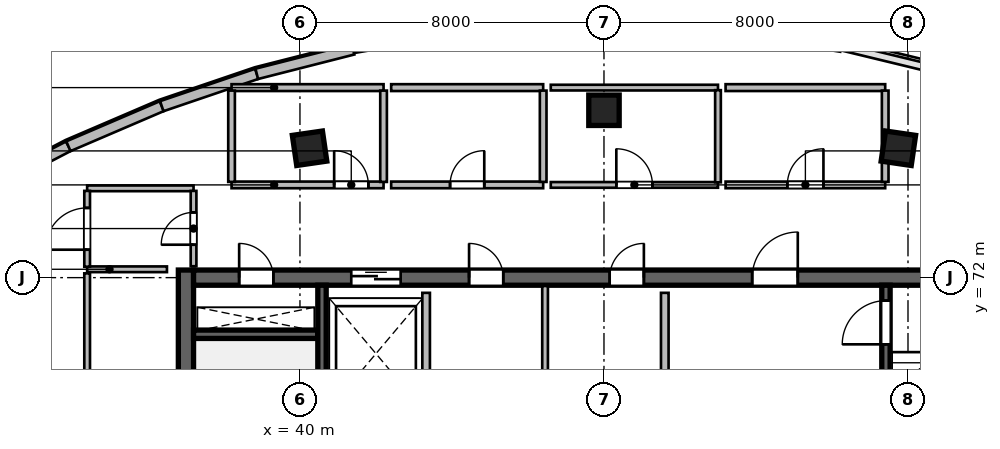
"""IFC4 building model, lengths in metres.
Left out: names, types, materials, properties, quantities, classifications, styles, units other than length and angle.
Written with IfcOpenShell. Run it as: python <this file> out.ifc"""

import sys

from ifc_helpers import new_model, si_unit, direction, frame, frame_2d, origin, origin_2d, place, context, subcontext, project, spatial, rectangle, extrude, source, transform, mapped, element, fill, save


model = new_model("IFC4")
c1 = context("Model", 3, precision=1e-05, world=origin(), true_north=direction((0.0, 1.0)))
c2 = subcontext(c1, "Body", "Model", "MODEL_VIEW")
j1 = project(units=[si_unit("LENGTHUNIT", "METRE"), si_unit("PLANEANGLEUNIT", "RADIAN")], contexts=[c1])
p1 = place(None, origin())
s1 = spatial("IfcSite", under=j1, at=p1, CompositionType="ELEMENT")
p2 = place(p1, origin())
s2 = spatial("IfcBuilding", under=s1, at=p2, CompositionType="ELEMENT")
p3 = place(p2, frame((0.0, 0.0, 299.1)))
s3 = spatial("IfcBuildingStorey", under=s2, at=p3, CompositionType="ELEMENT", Elevation=299.1)
m1 = source(origin(), c2, "Body", "SweptSolid", [
    extrude(rectangle(XDim=12.0, YDim=0.4, at=frame_2d((6.0, 0.0))), origin(), (0.0, 0.0, 1.0), 3.9),
])
p4 = place(p3, frame((37.0, 60.2, 0.0), z_axis=(0.0, 0.0, 1.0), x_axis=(0.0, 1.0, 0.0)))
e1 = element("IfcWall", 1, at=p4, inside=s3, PredefinedType="SHEAR", context=c2, shape_type="MappedRepresentation", body=[
    mapped(m1, transform((0.0, 0.0, 0.0), scale=1.0)),
])
m2 = source(origin(), c2, "Body", "SweptSolid", [
    extrude(rectangle(XDim=21.6, YDim=0.4, at=frame_2d((10.8, 0.0))), origin(), (0.0, 0.0, 1.0), 3.9),
])
p5 = place(p3, frame((37.2, 72.0, 0.0), z_axis=(0.0, 0.0, 1.0), x_axis=(1.0, 0.0, 0.0)))
e2 = element("IfcWall", 2, at=p5, inside=s3, PredefinedType="SHEAR", context=c2, shape_type="MappedRepresentation", body=[
    mapped(m2, transform((0.0, 0.0, 0.0), scale=1.0)),
])
p6 = place(p5, frame((1.2, 0.0, 0.0)))
e3 = element("IfcOpeningElement", 3, at=p6, cuts=e2, PredefinedType="OPENING", context=c2, shape_type="SweptSolid", body=[
    extrude(rectangle(XDim=0.9, YDim=2.1, at=frame_2d((0.45, 1.05))), frame((0.0, 0.21, 0.0), z_axis=(0.0, -1.0, 0.0), x_axis=(1.0, 0.0, 0.0)), (0.0, 0.0, 1.0), 0.42),
])
p7 = place(p5, frame((14.7, 0.0, 0.0)))
e4 = element("IfcOpeningElement", 4, at=p7, cuts=e2, PredefinedType="OPENING", context=c2, shape_type="SweptSolid", body=[
    extrude(rectangle(XDim=1.2, YDim=2.15, at=frame_2d((0.6, 1.075))), frame((0.0, 0.21, 0.0), z_axis=(0.0, -1.0, 0.0), x_axis=(1.0, 0.0, 0.0)), (0.0, 0.0, 1.0), 0.42),
])
p8 = place(p5, frame((4.15, 0.0, 0.0)))
e5 = element("IfcOpeningElement", 5, at=p8, cuts=e2, PredefinedType="OPENING", context=c2, shape_type="SweptSolid", body=[
    extrude(rectangle(XDim=1.3, YDim=2.15, at=frame_2d((0.65, 1.075))), frame((0.0, 0.21, 0.0), z_axis=(0.0, -1.0, 0.0), x_axis=(1.0, 0.0, 0.0)), (0.0, 0.0, 1.0), 0.42),
])
p9 = place(p5, frame((7.25, 0.0, 0.0)))
e6 = element("IfcOpeningElement", 6, at=p9, cuts=e2, PredefinedType="OPENING", context=c2, shape_type="SweptSolid", body=[
    extrude(rectangle(XDim=0.9, YDim=2.1, at=frame_2d((0.45, 1.05))), frame((0.0, 0.21, 0.0), z_axis=(0.0, -1.0, 0.0), x_axis=(1.0, 0.0, 0.0)), (0.0, 0.0, 1.0), 0.42),
])
p10 = place(p5, frame((10.95, 0.0, 0.0)))
e7 = element("IfcOpeningElement", 7, at=p10, cuts=e2, PredefinedType="OPENING", context=c2, shape_type="SweptSolid", body=[
    extrude(rectangle(XDim=0.9, YDim=2.1, at=frame_2d((0.45, 1.05))), frame((0.0, 0.21, 0.0), z_axis=(0.0, -1.0, 0.0), x_axis=(1.0, 0.0, 0.0)), (0.0, 0.0, 1.0), 0.42),
])
m3 = source(origin(), c2, "Body", "SweptSolid", [
    extrude(rectangle(XDim=3.27, YDim=0.22, at=frame_2d((1.635, 0.0))), origin(), (0.0, 0.0, 1.0), 3.9),
])
p11 = place(p3, frame((37.2, 70.51, 0.0), z_axis=(0.0, 0.0, 1.0), x_axis=(1.0, 0.0, 0.0)))
e8 = element("IfcWall", 8, at=p11, inside=s3, PredefinedType="SHEAR", context=c2, shape_type="MappedRepresentation", body=[
    mapped(m3, transform((0.0, 0.0, 0.0), scale=1.0)),
])
m4 = source(origin(), c2, "Body", "SweptSolid", [
    extrude(rectangle(XDim=11.2, YDim=0.22, at=frame_2d((5.6, 0.0))), origin(), (0.0, 0.0, 1.0), 3.9),
])
p12 = place(p3, frame((40.58, 60.6, 0.0), z_axis=(0.0, 0.0, 1.0), x_axis=(0.0, 1.0, 0.0)))
e9 = element("IfcWall", 9, at=p12, inside=s3, PredefinedType="SHEAR", context=c2, shape_type="MappedRepresentation", body=[
    mapped(m4, transform((0.0, 0.0, 0.0), scale=1.0)),
])
p13 = place(p3, frame((55.42, 60.6, 0.0), z_axis=(0.0, 0.0, 1.0), x_axis=(0.0, 1.0, 0.0)))
e10 = element("IfcWall", 10, at=p13, inside=s3, PredefinedType="SHEAR", context=c2, shape_type="MappedRepresentation", body=[
    mapped(m4, transform((0.0, 0.0, 0.0), scale=1.0)),
])
p14 = place(p13, frame((9.645, 0.0, 0.0)))
e11 = element("IfcOpeningElement", 11, at=p14, cuts=e10, PredefinedType="OPENING", context=c2, shape_type="SweptSolid", body=[
    extrude(rectangle(XDim=1.15, YDim=2.15, at=frame_2d((0.575, 1.075))), frame((0.0, 0.12, 0.0), z_axis=(0.0, -1.0, 0.0), x_axis=(1.0, 0.0, 0.0)), (0.0, 0.0, 1.0), 0.24),
])
m5 = source(origin(), c2, "Body", "SweptSolid", [
    extrude(rectangle(XDim=0.8, YDim=0.8, at=origin_2d()), origin(), (0.0, 0.0, 1.0), 3.9),
])
for number, where, z_axis, x_axis in (
    (12, (40.253, 75.404, 0.0), (0.0, 0.0, 1.0), (-0.143, 0.99, 0.0)),
    (13, (48.0, 76.404, 0.0), (0.0, 0.0, 1.0), (0.0, 1.0, 0.0)),
    (14, (55.747, 75.404, 0.0), (0.0, 0.0, 1.0), (0.143, 0.99, 0.0)),
):
    element("IfcColumn", number, at=place(p3, frame(where, z_axis=z_axis, x_axis=x_axis)), inside=s3, PredefinedType="COLUMN", context=c2, shape_type="MappedRepresentation", body=[
        mapped(m5, transform((0.0, 0.0, 0.0), scale=1.0)),
    ])
m6 = source(origin(), c2, "Body", "SweptSolid", [
    extrude(rectangle(XDim=2.711, YDim=0.28, at=frame_2d((1.356, 0.0))), origin(), (0.0, 0.0, 1.0), 3.64),
])
p15 = place(p3, frame((31.502, 74.205, 0.0), z_axis=(0.0, 0.0, 1.0), x_axis=(0.886828760751, 0.462098202881, 0.0)))
e15 = element("IfcWall", 15, at=p15, inside=s3, PredefinedType="SOLIDWALL", context=c2, shape_type="MappedRepresentation", body=[
    mapped(m6, transform((0.0, 0.0, 0.0), scale=1.0)),
])
m7 = source(origin(), c2, "Body", "SweptSolid", [
    extrude(rectangle(XDim=2.673, YDim=0.28, at=frame_2d((1.337, 0.0))), origin(), (0.0, 0.0, 1.0), 3.64),
])
p16 = place(p3, frame((33.907, 75.458, 0.0), z_axis=(0.0, 0.0, 1.0), x_axis=(0.919036345912, 0.394172798266, 0.0)))
e16 = element("IfcWall", 16, at=p16, inside=s3, PredefinedType="SOLIDWALL", context=c2, shape_type="MappedRepresentation", body=[
    mapped(m7, transform((0.0, 0.0, 0.0), scale=1.0)),
])
m8 = source(origin(), c2, "Body", "SweptSolid", [
    extrude(rectangle(XDim=2.64, YDim=0.28, at=frame_2d((1.32, 0.0))), origin(), (0.0, 0.0, 1.0), 3.64),
])
p17 = place(p3, frame((36.364, 76.511, 0.0), z_axis=(0.0, 0.0, 1.0), x_axis=(0.946685911962, 0.322158011064, 0.0)))
e17 = element("IfcWall", 17, at=p17, inside=s3, PredefinedType="SOLIDWALL", context=c2, shape_type="MappedRepresentation", body=[
    mapped(m8, transform((0.0, 0.0, 0.0), scale=1.0)),
])
m9 = source(origin(), c2, "Body", "SweptSolid", [
    extrude(rectangle(XDim=2.614, YDim=0.28, at=frame_2d((1.307, 0.0))), origin(), (0.0, 0.0, 1.0), 3.64),
])
p18 = place(p3, frame((38.863, 77.362, 0.0), z_axis=(0.0, 0.0, 1.0), x_axis=(0.969106509315, 0.246642602978, 0.0)))
e18 = element("IfcWall", 18, at=p18, inside=s3, PredefinedType="SOLIDWALL", context=c2, shape_type="MappedRepresentation", body=[
    mapped(m9, transform((0.0, 0.0, 0.0), scale=1.0)),
])
m10 = source(origin(), c2, "Body", "SweptSolid", [
    extrude(rectangle(XDim=5.8, YDim=0.2, at=frame_2d((2.9, 0.0))), origin(), (0.0, 0.0, 1.0), 3.64),
])
p19 = place(p3, frame((49.6, 65.8, 0.0), z_axis=(0.0, 0.0, 1.0), x_axis=(0.0, 1.0, 0.0)))
e19 = element("IfcWall", 19, at=p19, inside=s3, PredefinedType="SOLIDWALL", context=c2, shape_type="MappedRepresentation", body=[
    mapped(m10, transform((0.0, 0.0, 0.0), scale=1.0)),
])
m11 = source(origin(), c2, "Body", "SweptSolid", [
    extrude(rectangle(XDim=3.2, YDim=0.2, at=frame_2d((1.6, 0.0))), origin(), (0.0, 0.0, 1.0), 3.64),
])
p20 = place(p3, frame((43.32, 68.4, 0.0), z_axis=(0.0, 0.0, 1.0), x_axis=(0.0, 1.0, 0.0)))
e20 = element("IfcWall", 20, at=p20, inside=s3, PredefinedType="SOLIDWALL", context=c2, shape_type="MappedRepresentation", body=[
    mapped(m11, transform((0.0, 0.0, 0.0), scale=1.0)),
])
m12 = source(origin(), c2, "Body", "SweptSolid", [
    extrude(rectangle(XDim=3.38, YDim=0.15, at=frame_2d((1.69, 0.0))), origin(), (0.0, 0.0, 1.0), 3.64),
])
p21 = place(p3, frame((46.45, 68.4, 0.0), z_axis=(0.0, 0.0, 1.0), x_axis=(0.0, 1.0, 0.0)))
e21 = element("IfcWall", 21, at=p21, inside=s3, PredefinedType="PARTITIONING", context=c2, shape_type="MappedRepresentation", body=[
    mapped(m12, transform((0.0, 0.0, 0.0), scale=1.0)),
])
m13 = source(origin(), c2, "Body", "SweptSolid", [
    extrude(rectangle(XDim=2.1, YDim=0.15, at=frame_2d((1.05, 0.0))), origin(), (0.0, 0.0, 1.0), 3.64),
])
p22 = place(p3, frame((34.4, 72.22, 0.0), z_axis=(0.0, 0.0, 1.0), x_axis=(1.0, 0.0, 0.0)))
e22 = element("IfcWall", 22, at=p22, inside=s3, PredefinedType="PARTITIONING", context=c2, shape_type="MappedRepresentation", body=[
    mapped(m13, transform((0.0, 0.0, 0.0), scale=1.0)),
])
m14 = source(origin(), c2, "Body", "SweptSolid", [
    extrude(rectangle(XDim=2.8, YDim=0.15, at=frame_2d((1.4, 0.0))), origin(), (0.0, 0.0, 1.0), 3.64),
])
p23 = place(p3, frame((34.4, 74.35, 0.0), z_axis=(0.0, 0.0, 1.0), x_axis=(1.0, 0.0, 0.0)))
e23 = element("IfcWall", 23, at=p23, inside=s3, PredefinedType="PARTITIONING", context=c2, shape_type="MappedRepresentation", body=[
    mapped(m14, transform((0.0, 0.0, 0.0), scale=1.0)),
])
m15 = source(origin(), c2, "Body", "SweptSolid", [
    extrude(rectangle(XDim=1.995, YDim=0.15, at=frame_2d((0.998, 0.0))), origin(), (0.0, 0.0, 1.0), 3.64),
])
p24 = place(p3, frame((34.4, 72.288, 0.0), z_axis=(0.0, 0.0, 1.0), x_axis=(0.0, 1.0, 0.0)))
e24 = element("IfcWall", 24, at=p24, inside=s3, PredefinedType="PARTITIONING", context=c2, shape_type="MappedRepresentation", body=[
    mapped(m15, transform((0.0, 0.0, 0.0), scale=1.0)),
])
p25 = place(p24, frame((0.448, 0.0, 0.0)))
e25 = element("IfcOpeningElement", 25, at=p25, cuts=e24, PredefinedType="OPENING", context=c2, shape_type="SweptSolid", body=[
    extrude(rectangle(XDim=1.1, YDim=2.15, at=frame_2d((0.55, 1.075))), frame((0.0, 0.085, 0.0), z_axis=(0.0, -1.0, 0.0), x_axis=(1.0, 0.0, 0.0)), (0.0, 0.0, 1.0), 0.17),
])
m16 = source(origin(), c2, "Body", "SweptSolid", [
    extrude(rectangle(XDim=1.982, YDim=0.15, at=frame_2d((0.991, 0.0))), origin(), (0.0, 0.0, 1.0), 3.64),
])
p26 = place(p3, frame((37.2, 72.3, 0.0), z_axis=(0.0, 0.0, 1.0), x_axis=(0.0, 1.0, 0.0)))
e26 = element("IfcWall", 26, at=p26, inside=s3, PredefinedType="PARTITIONING", context=c2, shape_type="MappedRepresentation", body=[
    mapped(m16, transform((0.0, 0.0, 0.0), scale=1.0)),
])
p27 = place(p26, frame((0.566, 0.0, 0.0)))
e27 = element("IfcOpeningElement", 27, at=p27, cuts=e26, PredefinedType="OPENING", context=c2, shape_type="SweptSolid", body=[
    extrude(rectangle(XDim=0.85, YDim=2.1, at=frame_2d((0.425, 1.05))), frame((0.0, 0.085, 0.0), z_axis=(0.0, -1.0, 0.0), x_axis=(1.0, 0.0, 0.0)), (0.0, 0.0, 1.0), 0.17),
])
m17 = source(origin(), c2, "Body", "SweptSolid", [
    extrude(rectangle(XDim=3.845, YDim=0.15, at=frame_2d((1.922, 0.0))), origin(), (0.0, 0.0, 1.0), 3.64),
])
p28 = place(p3, frame((34.4, 68.268, 0.0), z_axis=(0.0, 0.0, 1.0), x_axis=(0.0, 1.0, 0.0)))
e28 = element("IfcWall", 28, at=p28, inside=s3, PredefinedType="PARTITIONING", context=c2, shape_type="MappedRepresentation", body=[
    mapped(m17, transform((0.0, 0.0, 0.0), scale=1.0)),
])
m18 = source(origin(), c2, "Body", "SweptSolid", [
    extrude(rectangle(XDim=4.0, YDim=0.175, at=frame_2d((2.0, 0.0))), origin(), (0.0, 0.0, 1.0), 3.64),
])
p29 = place(p3, frame((38.2, 74.44, 0.0), z_axis=(0.0, 0.0, 1.0), x_axis=(1.0, 0.0, 0.0)))
e29 = element("IfcWall", 29, at=p29, inside=s3, PredefinedType="PARTITIONING", context=c2, shape_type="MappedRepresentation", body=[
    mapped(m18, transform((0.0, 0.0, 0.0), scale=1.0)),
])
p30 = place(p29, frame((2.7, 0.0, 0.0)))
e30 = element("IfcOpeningElement", 30, at=p30, cuts=e29, PredefinedType="OPENING", context=c2, shape_type="SweptSolid", body=[
    extrude(rectangle(XDim=0.9, YDim=2.08, at=frame_2d((0.45, 1.04))), frame((0.0, 0.098, 0.0), z_axis=(0.0, -1.0, 0.0), x_axis=(1.0, 0.0, 0.0)), (0.0, 0.0, 1.0), 0.195),
])
m19 = source(origin(), c2, "Body", "SweptSolid", [
    extrude(rectangle(XDim=4.0, YDim=0.18, at=frame_2d((2.0, 0.0))), origin(), (0.0, 0.0, 1.0), 3.64),
])
p31 = place(p3, frame((38.2, 77.0, 0.0), z_axis=(0.0, 0.0, 1.0), x_axis=(1.0, 0.0, 0.0)))
e31 = element("IfcWall", 31, at=p31, inside=s3, PredefinedType="PLUMBINGWALL", context=c2, shape_type="MappedRepresentation", body=[
    mapped(m19, transform((0.0, 0.0, 0.0), scale=1.0)),
])
m20 = source(origin(), c2, "Body", "SweptSolid", [
    extrude(rectangle(XDim=2.403, YDim=0.175, at=frame_2d((1.201, 0.0))), origin(), (0.0, 0.0, 1.0), 3.64),
])
for number, where, z_axis, x_axis in (
    (32, (38.2, 74.519, 0.0), (0.0, 0.0, 1.0), (0.0, 1.0, 0.0)),
    (33, (42.2, 74.519, 0.0), (0.0, 0.0, 1.0), (0.0, 1.0, 0.0)),
):
    element("IfcWall", number, at=place(p3, frame(where, z_axis=z_axis, x_axis=x_axis)), inside=s3, PredefinedType="PARTITIONING", context=c2, shape_type="MappedRepresentation", body=[
        mapped(m20, transform((0.0, 0.0, 0.0), scale=1.0)),
    ])
p32 = place(p3, frame((42.4, 74.44, 0.0), z_axis=(0.0, 0.0, 1.0), x_axis=(1.0, 0.0, 0.0)))
e34 = element("IfcWall", 34, at=p32, inside=s3, PredefinedType="PARTITIONING", context=c2, shape_type="MappedRepresentation", body=[
    mapped(m18, transform((0.0, 0.0, 0.0), scale=1.0)),
])
p33 = place(p32, frame((1.55, 0.0, 0.0)))
e35 = element("IfcOpeningElement", 35, at=p33, cuts=e34, PredefinedType="OPENING", context=c2, shape_type="SweptSolid", body=[
    extrude(rectangle(XDim=0.9, YDim=2.08, at=frame_2d((0.45, 1.04))), frame((0.0, 0.098, 0.0), z_axis=(0.0, -1.0, 0.0), x_axis=(1.0, 0.0, 0.0)), (0.0, 0.0, 1.0), 0.195),
])
p34 = place(p3, frame((42.4, 77.0, 0.0), z_axis=(0.0, 0.0, 1.0), x_axis=(1.0, 0.0, 0.0)))
e36 = element("IfcWall", 36, at=p34, inside=s3, PredefinedType="PLUMBINGWALL", context=c2, shape_type="MappedRepresentation", body=[
    mapped(m19, transform((0.0, 0.0, 0.0), scale=1.0)),
])
p35 = place(p3, frame((46.4, 74.519, 0.0), z_axis=(0.0, 0.0, 1.0), x_axis=(0.0, 1.0, 0.0)))
e37 = element("IfcWall", 37, at=p35, inside=s3, PredefinedType="PARTITIONING", context=c2, shape_type="MappedRepresentation", body=[
    mapped(m20, transform((0.0, 0.0, 0.0), scale=1.0)),
])
m21 = source(origin(), c2, "Body", "SweptSolid", [
    extrude(rectangle(XDim=4.4, YDim=0.15, at=frame_2d((2.2, 0.0))), origin(), (0.0, 0.0, 1.0), 3.64),
])
p36 = place(p3, frame((46.6, 74.44, 0.0), z_axis=(0.0, 0.0, 1.0), x_axis=(1.0, 0.0, 0.0)))
e38 = element("IfcWall", 38, at=p36, inside=s3, PredefinedType="PARTITIONING", context=c2, shape_type="MappedRepresentation", body=[
    mapped(m21, transform((0.0, 0.0, 0.0), scale=1.0)),
])
p37 = place(p36, frame((1.725, 0.0, 0.0)))
e39 = element("IfcOpeningElement", 39, at=p37, cuts=e38, PredefinedType="OPENING", context=c2, shape_type="SweptSolid", body=[
    extrude(rectangle(XDim=0.95, YDim=2.1, at=frame_2d((0.475, 1.05))), frame((0.0, 0.085, 0.0), z_axis=(0.0, -1.0, 0.0), x_axis=(1.0, 0.0, 0.0)), (0.0, 0.0, 1.0), 0.17),
])
p38 = place(p3, frame((46.6, 77.0, 0.0), z_axis=(0.0, 0.0, 1.0), x_axis=(1.0, 0.0, 0.0)))
e40 = element("IfcWall", 40, at=p38, inside=s3, PredefinedType="PARTITIONING", context=c2, shape_type="MappedRepresentation", body=[
    mapped(m21, transform((0.0, 0.0, 0.0), scale=1.0)),
])
m22 = source(origin(), c2, "Body", "SweptSolid", [
    extrude(rectangle(XDim=2.425, YDim=0.15, at=frame_2d((1.212, 0.0))), origin(), (0.0, 0.0, 1.0), 3.64),
])
p39 = place(p3, frame((51.0, 74.508, 0.0), z_axis=(0.0, 0.0, 1.0), x_axis=(0.0, 1.0, 0.0)))
e41 = element("IfcWall", 41, at=p39, inside=s3, PredefinedType="PARTITIONING", context=c2, shape_type="MappedRepresentation", body=[
    mapped(m22, transform((0.0, 0.0, 0.0), scale=1.0)),
])
m23 = source(origin(), c2, "Body", "SweptSolid", [
    extrude(rectangle(XDim=4.2, YDim=0.175, at=frame_2d((2.1, 0.0))), origin(), (0.0, 0.0, 1.0), 3.64),
])
p40 = place(p3, frame((51.2, 74.44, 0.0), z_axis=(0.0, 0.0, 1.0), x_axis=(1.0, 0.0, 0.0)))
e42 = element("IfcWall", 42, at=p40, inside=s3, PredefinedType="PARTITIONING", context=c2, shape_type="MappedRepresentation", body=[
    mapped(m23, transform((0.0, 0.0, 0.0), scale=1.0)),
])
p41 = place(p40, frame((1.625, 0.0, 0.0)))
e43 = element("IfcOpeningElement", 43, at=p41, cuts=e42, PredefinedType="OPENING", context=c2, shape_type="SweptSolid", body=[
    extrude(rectangle(XDim=0.95, YDim=2.12, at=frame_2d((0.475, 1.06))), frame((0.0, 0.098, 0.0), z_axis=(0.0, -1.0, 0.0), x_axis=(1.0, 0.0, 0.0)), (0.0, 0.0, 1.0), 0.195),
])
m24 = source(origin(), c2, "Body", "SweptSolid", [
    extrude(rectangle(XDim=4.2, YDim=0.18, at=frame_2d((2.1, 0.0))), origin(), (0.0, 0.0, 1.0), 3.64),
])
p42 = place(p3, frame((51.2, 77.0, 0.0), z_axis=(0.0, 0.0, 1.0), x_axis=(1.0, 0.0, 0.0)))
e44 = element("IfcWall", 44, at=p42, inside=s3, PredefinedType="PLUMBINGWALL", context=c2, shape_type="MappedRepresentation", body=[
    mapped(m24, transform((0.0, 0.0, 0.0), scale=1.0)),
])
p43 = place(p3, frame((55.4, 74.519, 0.0), z_axis=(0.0, 0.0, 1.0), x_axis=(0.0, 1.0, 0.0)))
e45 = element("IfcWall", 45, at=p43, inside=s3, PredefinedType="PARTITIONING", context=c2, shape_type="MappedRepresentation", body=[
    mapped(m20, transform((0.0, 0.0, 0.0), scale=1.0)),
])
m25 = source(origin(), c2, "Body", "SweptSolid", [
    extrude(rectangle(XDim=0.9, YDim=2.1, at=frame_2d((0.45, 1.05))), frame((0.0, 0.025, 0.0), z_axis=(0.0, -1.0, 0.0), x_axis=(1.0, 0.0, 0.0)), (0.0, 0.0, 1.0), 0.05),
])
p44 = place(p6, origin())
e46 = element("IfcDoor", 46, at=p44, inside=s3, OperationType="SINGLE_SWING_LEFT", PredefinedType="DOOR", context=c2, shape_type="MappedRepresentation", body=[
    mapped(m25, transform((0.0, 0.0, 0.0), scale=1.0)),
])
fill(e3, e46)
m26 = source(origin(), c2, "Body", "SweptSolid", [
    extrude(rectangle(XDim=1.15, YDim=2.15, at=frame_2d((0.575, 1.075))), frame((0.0, 0.025, 0.0), z_axis=(0.0, -1.0, 0.0), x_axis=(1.0, 0.0, 0.0)), (0.0, 0.0, 1.0), 0.05),
])
p45 = place(p14, origin())
e47 = element("IfcDoor", 47, at=p45, inside=s3, OperationType="SINGLE_SWING_LEFT", PredefinedType="DOOR", context=c2, shape_type="MappedRepresentation", body=[
    mapped(m26, transform((0.0, 0.0, 0.0), scale=1.0)),
])
fill(e11, e47)
m27 = source(origin(), c2, "Body", "SweptSolid", [
    extrude(rectangle(XDim=1.2, YDim=2.15, at=frame_2d((0.6, 1.075))), frame((0.0, 0.025, 0.0), z_axis=(0.0, -1.0, 0.0), x_axis=(1.0, 0.0, 0.0)), (0.0, 0.0, 1.0), 0.05),
])
p46 = place(p7, origin())
e48 = element("IfcDoor", 48, at=p46, inside=s3, OperationType="SINGLE_SWING_RIGHT", PredefinedType="DOOR", context=c2, shape_type="MappedRepresentation", body=[
    mapped(m27, transform((0.0, 0.0, 0.0), scale=1.0)),
])
fill(e4, e48)
m28 = source(origin(), c2, "Body", "SweptSolid", [
    extrude(rectangle(XDim=1.3, YDim=2.15, at=frame_2d((0.65, 1.075))), frame((0.0, 0.025, 0.0), z_axis=(0.0, -1.0, 0.0), x_axis=(1.0, 0.0, 0.0)), (0.0, 0.0, 1.0), 0.05),
])
p47 = place(p8, origin())
e49 = element("IfcDoor", 49, at=p47, inside=s3, OperationType="DOUBLE_DOOR_SLIDING", PredefinedType="DOOR", context=c2, shape_type="MappedRepresentation", body=[
    mapped(m28, transform((0.0, 0.0, 0.0), scale=1.0)),
])
fill(e5, e49)
p48 = place(p9, origin())
e50 = element("IfcDoor", 50, at=p48, inside=s3, OperationType="SINGLE_SWING_LEFT", PredefinedType="DOOR", context=c2, shape_type="MappedRepresentation", body=[
    mapped(m25, transform((0.0, 0.0, 0.0), scale=1.0)),
])
fill(e6, e50)
p49 = place(p10, origin())
e51 = element("IfcDoor", 51, at=p49, inside=s3, OperationType="SINGLE_SWING_RIGHT", PredefinedType="DOOR", context=c2, shape_type="MappedRepresentation", body=[
    mapped(m25, transform((0.0, 0.0, 0.0), scale=1.0)),
])
fill(e7, e51)
m29 = source(origin(), c2, "Body", "SweptSolid", [
    extrude(rectangle(XDim=0.85, YDim=2.1, at=frame_2d((0.425, 1.05))), frame((0.0, 0.025, 0.0), z_axis=(0.0, -1.0, 0.0), x_axis=(1.0, 0.0, 0.0)), (0.0, 0.0, 1.0), 0.05),
])
p50 = place(p27, origin())
e52 = element("IfcDoor", 52, at=p50, inside=s3, OperationType="SINGLE_SWING_LEFT", PredefinedType="DOOR", context=c2, shape_type="MappedRepresentation", body=[
    mapped(m29, transform((0.0, 0.0, 0.0), scale=1.0)),
])
fill(e27, e52)
m30 = source(origin(), c2, "Body", "SweptSolid", [
    extrude(rectangle(XDim=0.9, YDim=2.08, at=frame_2d((0.45, 1.04))), frame((0.0, 0.025, 0.0), z_axis=(0.0, -1.0, 0.0), x_axis=(1.0, 0.0, 0.0)), (0.0, 0.0, 1.0), 0.05),
])
p51 = place(p30, origin())
e53 = element("IfcDoor", 53, at=p51, inside=s3, OperationType="SINGLE_SWING_LEFT", PredefinedType="DOOR", context=c2, shape_type="MappedRepresentation", body=[
    mapped(m30, transform((0.0, 0.0, 0.0), scale=1.0)),
])
fill(e30, e53)
p52 = place(p33, origin())
e54 = element("IfcDoor", 54, at=p52, inside=s3, OperationType="SINGLE_SWING_RIGHT", PredefinedType="DOOR", context=c2, shape_type="MappedRepresentation", body=[
    mapped(m30, transform((0.0, 0.0, 0.0), scale=1.0)),
])
fill(e35, e54)
m31 = source(origin(), c2, "Body", "SweptSolid", [
    extrude(rectangle(XDim=0.95, YDim=2.1, at=frame_2d((0.475, 1.05))), frame((0.0, 0.025, 0.0), z_axis=(0.0, -1.0, 0.0), x_axis=(1.0, 0.0, 0.0)), (0.0, 0.0, 1.0), 0.05),
])
p53 = place(p37, origin())
e55 = element("IfcDoor", 55, at=p53, inside=s3, OperationType="SINGLE_SWING_LEFT", PredefinedType="DOOR", context=c2, shape_type="MappedRepresentation", body=[
    mapped(m31, transform((0.0, 0.0, 0.0), scale=1.0)),
])
fill(e39, e55)
m32 = source(origin(), c2, "Body", "SweptSolid", [
    extrude(rectangle(XDim=0.95, YDim=2.12, at=frame_2d((0.475, 1.06))), frame((0.0, 0.025, 0.0), z_axis=(0.0, -1.0, 0.0), x_axis=(1.0, 0.0, 0.0)), (0.0, 0.0, 1.0), 0.05),
])
p54 = place(p41, origin())
e56 = element("IfcDoor", 56, at=p54, inside=s3, OperationType="SINGLE_SWING_RIGHT", PredefinedType="DOOR", context=c2, shape_type="MappedRepresentation", body=[
    mapped(m32, transform((0.0, 0.0, 0.0), scale=1.0)),
])
fill(e43, e56)
m33 = source(origin(), c2, "Body", "SweptSolid", [
    extrude(rectangle(XDim=1.1, YDim=2.15, at=frame_2d((0.55, 1.075))), frame((0.0, 0.025, 0.0), z_axis=(0.0, -1.0, 0.0), x_axis=(1.0, 0.0, 0.0)), (0.0, 0.0, 1.0), 0.05),
])
p55 = place(p25, origin())
e57 = element("IfcDoor", 57, at=p55, inside=s3, OperationType="SINGLE_SWING_LEFT", PredefinedType="DOOR", context=c2, shape_type="MappedRepresentation", body=[
    mapped(m33, transform((0.0, 0.0, 0.0), scale=1.0)),
])
fill(e25, e57)
save(model, sys.argv[1])
